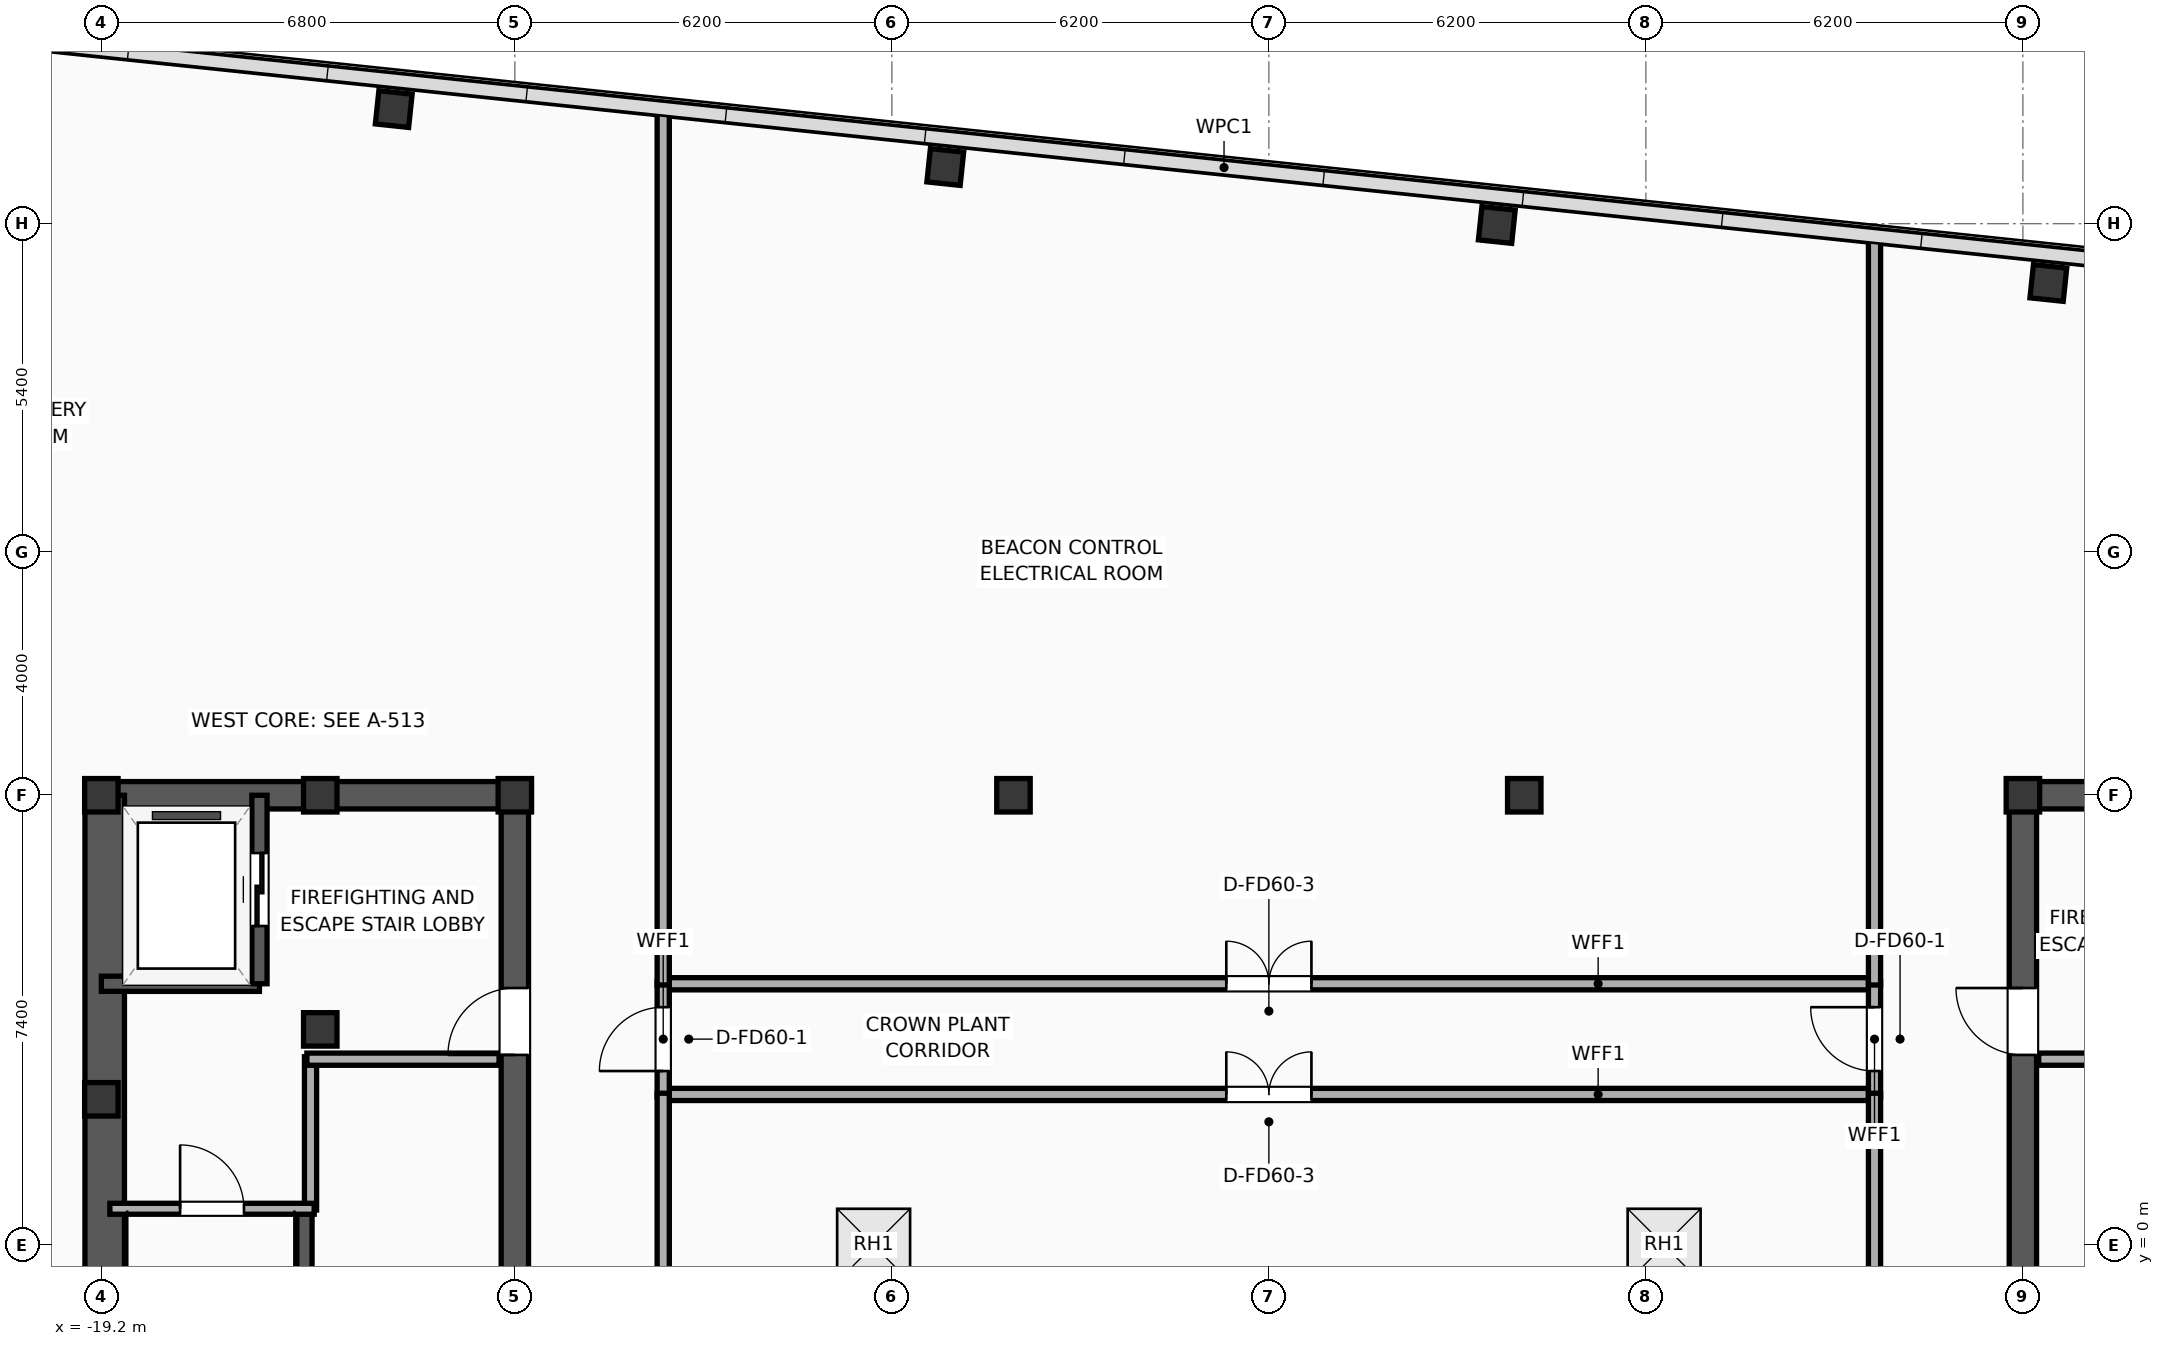
"""IFC4 building model, lengths in metres.
Left out: names, types, materials, properties, quantities, classifications, styles, units other than length and angle.
Written with IfcOpenShell. Run it as: python <this file> out.ifc"""

import sys

from ifc_helpers import new_model, si_unit, direction, frame, frame_2d, origin, origin_2d, place, context, subcontext, project, spatial, rectangle, hollow_rectangle, extrude, element, fill, save


model = new_model("IFC4")
c1 = context("Model", 3, precision=1e-05, world=origin(), true_north=direction((0.0, 1.0)))
c2 = subcontext(c1, "Body", "Model", "MODEL_VIEW")
j1 = project(units=[si_unit("LENGTHUNIT", "METRE"), si_unit("PLANEANGLEUNIT", "RADIAN")], contexts=[c1])
p1 = place(None, origin())
s1 = spatial("IfcSite", under=j1, at=p1, CompositionType="ELEMENT")
p2 = place(p1, origin())
s2 = spatial("IfcBuilding", under=s1, at=p2, CompositionType="ELEMENT")
p3 = place(p2, frame((0.0, 0.0, 337.2)))
s3 = spatial("IfcBuildingStorey", under=s2, at=p3, CompositionType="ELEMENT", Elevation=337.2)
for number, where, z_axis, x_axis in (
    (1, (-19.2, 2.4, 0.0), (0.0, 0.0, 1.0), (1.0, 0.0, 0.0)),
    (2, (-19.2, 7.4, 0.0), (0.0, 0.0, 1.0), (1.0, 0.0, 0.0)),
    (3, (-15.6, 7.4, 0.0), (0.0, 0.0, 1.0), (1.0, 0.0, 0.0)),
    (4, (-15.6, 3.55, 0.0), (0.0, 0.0, 1.0), (1.0, 0.0, 0.0)),
    (5, (-12.4, 7.4, 0.0), (0.0, 0.0, 1.0), (1.0, 0.0, 0.0)),
    (6, (12.4, 7.4, 0.0), (0.0, 0.0, 1.0), (1.0, 0.0, 0.0)),
):
    element("IfcColumn", number, at=place(p3, frame(where, z_axis=z_axis, x_axis=x_axis)), inside=s3, PredefinedType="COLUMN", context=c2, shape_type="SweptSolid", body=[
        extrude(hollow_rectangle(XDim=0.55, YDim=0.55, WallThickness=0.022, at=origin_2d()), origin(), (0.0, 0.0, 1.0), 5.22),
    ])
p4 = place(p3, frame((-19.425, 7.4, 0.0), z_axis=(0.0, 0.0, 1.0), x_axis=(1.0, 0.0, 0.0)))
e7 = element("IfcWall", 7, at=p4, inside=s3, PredefinedType="SHEAR", context=c2, shape_type="SweptSolid", body=[
    extrude(rectangle(XDim=7.25, YDim=0.45, at=frame_2d((3.625, 0.0))), origin(), (0.0, 0.0, 1.0), 4.96),
])
p5 = place(p3, frame((-19.145, -7.4, 0.0), z_axis=(0.0, 0.0, 1.0), x_axis=(0.0, 1.0, 0.0)))
e8 = element("IfcWall", 8, at=p5, inside=s3, PredefinedType="SHEAR", context=c2, shape_type="SweptSolid", body=[
    extrude(rectangle(XDim=14.8, YDim=0.65, at=frame_2d((7.4, 0.0))), origin(), (0.0, 0.0, 1.0), 4.96),
])
p6 = place(p3, frame((-12.4, -7.4, 0.0), z_axis=(0.0, 0.0, 1.0), x_axis=(0.0, 1.0, 0.0)))
e9 = element("IfcWall", 9, at=p6, inside=s3, PredefinedType="SHEAR", context=c2, shape_type="SweptSolid", body=[
    extrude(rectangle(XDim=14.8, YDim=0.45, at=frame_2d((7.4, 0.0))), origin(), (0.0, 0.0, 1.0), 4.96),
])
p7 = place(p6, frame((10.53, 0.0, 0.0)))
e10 = element("IfcOpeningElement", 10, at=p7, cuts=e9, PredefinedType="OPENING", context=c2, shape_type="SweptSolid", body=[
    extrude(rectangle(XDim=1.1, YDim=2.05, at=frame_2d((0.55, 1.025))), frame((0.0, 0.235, 0.0), z_axis=(0.0, -1.0, 0.0), x_axis=(1.0, 0.0, 0.0)), (0.0, 0.0, 1.0), 0.47),
])
p8 = place(p6, frame((4.45, 0.0, 0.0)))
e11 = element("IfcOpeningElement", 11, at=p8, cuts=e9, PredefinedType="OPENING", context=c2, shape_type="SweptSolid", body=[
    extrude(rectangle(XDim=0.9, YDim=2.05, at=frame_2d((0.45, 1.025))), frame((0.0, 0.235, 0.0), z_axis=(0.0, -1.0, 0.0), x_axis=(1.0, 0.0, 0.0)), (0.0, 0.0, 1.0), 0.47),
])
p9 = place(p3, frame((-15.86, -7.085, 0.0), z_axis=(0.0, 0.0, 1.0), x_axis=(0.0, 1.0, 0.0)))
e12 = element("IfcWall", 12, at=p9, inside=s3, PredefinedType="SOLIDWALL", context=c2, shape_type="SweptSolid", body=[
    extrude(rectangle(XDim=7.685, YDim=0.25, at=frame_2d((3.843, 0.0))), origin(), (0.0, 0.0, 1.0), 4.96),
])
p10 = place(p3, frame((12.175, 7.4, 0.0), z_axis=(0.0, 0.0, 1.0), x_axis=(1.0, 0.0, 0.0)))
e13 = element("IfcWall", 13, at=p10, inside=s3, PredefinedType="SHEAR", context=c2, shape_type="SweptSolid", body=[
    extrude(rectangle(XDim=7.25, YDim=0.45, at=frame_2d((3.625, 0.0))), origin(), (0.0, 0.0, 1.0), 4.96),
])
p11 = place(p3, frame((12.4, -7.4, 0.0), z_axis=(0.0, 0.0, 1.0), x_axis=(0.0, 1.0, 0.0)))
e14 = element("IfcWall", 14, at=p11, inside=s3, PredefinedType="SHEAR", context=c2, shape_type="SweptSolid", body=[
    extrude(rectangle(XDim=14.8, YDim=0.45, at=frame_2d((7.4, 0.0))), origin(), (0.0, 0.0, 1.0), 4.96),
])
p12 = place(p11, frame((10.53, 0.0, 0.0)))
e15 = element("IfcOpeningElement", 15, at=p12, cuts=e14, PredefinedType="OPENING", context=c2, shape_type="SweptSolid", body=[
    extrude(rectangle(XDim=1.1, YDim=2.05, at=frame_2d((0.55, 1.025))), frame((0.0, 0.235, 0.0), z_axis=(0.0, -1.0, 0.0), x_axis=(1.0, 0.0, 0.0)), (0.0, 0.0, 1.0), 0.47),
])
p13 = place(p11, frame((4.45, 0.0, 0.0)))
e16 = element("IfcOpeningElement", 16, at=p13, cuts=e14, PredefinedType="OPENING", context=c2, shape_type="SweptSolid", body=[
    extrude(rectangle(XDim=0.9, YDim=2.05, at=frame_2d((0.45, 1.025))), frame((0.0, 0.235, 0.0), z_axis=(0.0, -1.0, 0.0), x_axis=(1.0, 0.0, 0.0)), (0.0, 0.0, 1.0), 0.47),
])
for number, where, z_axis, x_axis in (
    (17, (-4.2, 7.4, 0.0), (0.0, 0.0, 1.0), (1.0, 0.0, 0.0)),
    (18, (4.2, 7.4, 0.0), (0.0, 0.0, 1.0), (1.0, 0.0, 0.0)),
):
    element("IfcColumn", number, at=place(p3, frame(where, z_axis=z_axis, x_axis=x_axis)), inside=s3, PredefinedType="COLUMN", context=c2, shape_type="SweptSolid", body=[
        extrude(hollow_rectangle(XDim=0.55, YDim=0.55, WallThickness=0.022, at=origin_2d()), origin(), (0.0, 0.0, 1.0), 5.22),
    ])
for number, where, z_axis, x_axis in (
    (19, (12.819, 15.825, 0.0), (0.0, 0.0, 1.0), (0.995, -0.105, 0.0)),
    (20, (3.749, 16.778, 0.0), (0.0, 0.0, 1.0), (0.995, -0.105, 0.0)),
    (21, (-5.322, 17.732, 0.0), (0.0, 0.0, 1.0), (0.995, -0.105, 0.0)),
    (22, (-14.392, 18.685, 0.0), (0.0, 0.0, 1.0), (0.995, -0.105, 0.0)),
):
    element("IfcColumn", number, at=place(p3, frame(where, z_axis=z_axis, x_axis=x_axis)), inside=s3, PredefinedType="COLUMN", context=c2, shape_type="SweptSolid", body=[
        extrude(hollow_rectangle(XDim=0.55, YDim=0.55, WallThickness=0.022, at=origin_2d()), origin(), (0.0, 0.0, 1.0), 5.265),
    ])
p14 = place(p3, frame((-23.395, 20.104, 0.0), z_axis=(0.0, 0.0, 1.0), x_axis=(0.994522116558, -0.104526358762, 0.0)))
e23 = element("IfcWall", 23, at=p14, inside=s3, PredefinedType="PARAPET", context=c2, shape_type="SweptSolid", body=[
    extrude(rectangle(XDim=45.564, YDim=0.22, at=frame_2d((22.782, 0.0))), origin(), (0.0, 0.0, 1.0), 1.2),
])
p15 = place(p3, frame((-19.2, 4.3, 0.0), z_axis=(0.0, 0.0, 1.0), x_axis=(1.0, 0.0, 0.0)))
e24 = element("IfcWall", 24, at=p15, inside=s3, PredefinedType="SOLIDWALL", context=c2, shape_type="SweptSolid", body=[
    extrude(rectangle(XDim=2.6, YDim=0.25, at=frame_2d((1.3, 0.0))), origin(), (0.0, 0.0, 1.0), 4.96),
])
p16 = place(p3, frame((-16.6, 4.3, 0.0), z_axis=(0.0, 0.0, 1.0), x_axis=(0.0, 1.0, 0.0)))
e25 = element("IfcWall", 25, at=p16, inside=s3, PredefinedType="SOLIDWALL", context=c2, shape_type="SweptSolid", body=[
    extrude(rectangle(XDim=3.1, YDim=0.25, at=frame_2d((1.55, 0.0))), origin(), (0.0, 0.0, 1.0), 4.96),
])
p17 = place(p16, frame((0.95, 0.0, 0.0)))
e26 = element("IfcOpeningElement", 26, at=p17, cuts=e25, PredefinedType="OPENING", context=c2, shape_type="SweptSolid", body=[
    extrude(rectangle(XDim=1.2, YDim=2.05, at=frame_2d((0.6, 1.025))), frame((0.0, 0.135, 0.0), z_axis=(0.0, -1.0, 0.0), x_axis=(1.0, 0.0, 0.0)), (0.0, 0.0, 1.0), 0.27),
])
p18 = place(p3, frame((-15.76, 0.58, 0.0), z_axis=(0.0, 0.0, 1.0), x_axis=(0.0, 1.0, 0.0)))
e27 = element("IfcWall", 27, at=p18, inside=s3, PredefinedType="PARTITIONING", context=c2, shape_type="SweptSolid", body=[
    extrude(rectangle(XDim=2.52, YDim=0.2, at=frame_2d((1.26, 0.0))), origin(), (0.0, 0.0, 1.0), 4.96),
])
p19 = place(p3, frame((-15.82, 3.06, 0.0), z_axis=(0.0, 0.0, 1.0), x_axis=(1.0, 0.0, 0.0)))
e28 = element("IfcWall", 28, at=p19, inside=s3, PredefinedType="PARTITIONING", context=c2, shape_type="SweptSolid", body=[
    extrude(rectangle(XDim=3.16, YDim=0.2, at=frame_2d((1.58, 0.0))), origin(), (0.0, 0.0, 1.0), 4.96),
])
p20 = place(p3, frame((-19.06, 0.6, 0.0), z_axis=(0.0, 0.0, 1.0), x_axis=(1.0, 0.0, 0.0)))
e29 = element("IfcWall", 29, at=p20, inside=s3, PredefinedType="PARTITIONING", context=c2, shape_type="SweptSolid", body=[
    extrude(rectangle(XDim=3.36, YDim=0.18, at=frame_2d((1.68, 0.0))), origin(), (0.0, 0.0, 1.0), 4.96),
])
p21 = place(p20, frame((1.155, 0.0, 0.0)))
e30 = element("IfcOpeningElement", 30, at=p21, cuts=e29, PredefinedType="OPENING", context=c2, shape_type="SweptSolid", body=[
    extrude(rectangle(XDim=1.05, YDim=2.05, at=frame_2d((0.525, 1.025))), frame((0.0, 0.1, 0.0), z_axis=(0.0, -1.0, 0.0), x_axis=(1.0, 0.0, 0.0)), (0.0, 0.0, 1.0), 0.2),
])
p22 = place(p3, frame((12.66, 3.06, 0.0), z_axis=(0.0, 0.0, 1.0), x_axis=(1.0, 0.0, 0.0)))
e31 = element("IfcWall", 31, at=p22, inside=s3, PredefinedType="PARTITIONING", context=c2, shape_type="SweptSolid", body=[
    extrude(rectangle(XDim=3.16, YDim=0.2, at=frame_2d((1.58, 0.0))), origin(), (0.0, 0.0, 1.0), 4.96),
])
p23 = place(p3, frame((-9.98, 2.48, 0.0), z_axis=(0.0, 0.0, 1.0), x_axis=(1.0, 0.0, 0.0)))
e32 = element("IfcWall", 32, at=p23, inside=s3, PredefinedType="PARTITIONING", context=c2, shape_type="SweptSolid", body=[
    extrude(rectangle(XDim=19.96, YDim=0.2, at=frame_2d((9.98, 0.0))), origin(), (0.0, 0.0, 1.0), 4.53),
])
p24 = place(p23, frame((9.28, 0.0, 0.0)))
e33 = element("IfcOpeningElement", 33, at=p24, cuts=e32, PredefinedType="OPENING", context=c2, shape_type="SweptSolid", body=[
    extrude(rectangle(XDim=1.4, YDim=2.05, at=frame_2d((0.7, 1.025))), frame((0.0, 0.11, 0.0), z_axis=(0.0, -1.0, 0.0), x_axis=(1.0, 0.0, 0.0)), (0.0, 0.0, 1.0), 0.22),
])
p25 = place(p3, frame((-9.98, 4.3, 0.0), z_axis=(0.0, 0.0, 1.0), x_axis=(1.0, 0.0, 0.0)))
e34 = element("IfcWall", 34, at=p25, inside=s3, PredefinedType="PARTITIONING", context=c2, shape_type="SweptSolid", body=[
    extrude(rectangle(XDim=19.96, YDim=0.2, at=frame_2d((9.98, 0.0))), origin(), (0.0, 0.0, 1.0), 4.96),
])
p26 = place(p25, frame((9.28, 0.0, 0.0)))
e35 = element("IfcOpeningElement", 35, at=p26, cuts=e34, PredefinedType="OPENING", context=c2, shape_type="SweptSolid", body=[
    extrude(rectangle(XDim=1.4, YDim=2.05, at=frame_2d((0.7, 1.025))), frame((0.0, 0.11, 0.0), z_axis=(0.0, -1.0, 0.0), x_axis=(1.0, 0.0, 0.0)), (0.0, 0.0, 1.0), 0.22),
])
p27 = place(p3, frame((-9.96, 2.44, 0.0), z_axis=(0.0, 0.0, 1.0), x_axis=(0.0, 1.0, 0.0)))
e36 = element("IfcWall", 36, at=p27, inside=s3, PredefinedType="PARTITIONING", context=c2, shape_type="SweptSolid", body=[
    extrude(rectangle(XDim=1.9, YDim=0.2, at=frame_2d((0.95, 0.0))), origin(), (0.0, 0.0, 1.0), 4.96),
])
p28 = place(p27, frame((0.425, 0.0, 0.0)))
e37 = element("IfcOpeningElement", 37, at=p28, cuts=e36, PredefinedType="OPENING", context=c2, shape_type="SweptSolid", body=[
    extrude(rectangle(XDim=1.05, YDim=2.05, at=frame_2d((0.525, 1.025))), frame((0.0, 0.11, 0.0), z_axis=(0.0, -1.0, 0.0), x_axis=(1.0, 0.0, 0.0)), (0.0, 0.0, 1.0), 0.22),
])
p29 = place(p3, frame((9.96, 2.44, 0.0), z_axis=(0.0, 0.0, 1.0), x_axis=(0.0, 1.0, 0.0)))
e38 = element("IfcWall", 38, at=p29, inside=s3, PredefinedType="PARTITIONING", context=c2, shape_type="SweptSolid", body=[
    extrude(rectangle(XDim=1.9, YDim=0.2, at=frame_2d((0.95, 0.0))), origin(), (0.0, 0.0, 1.0), 4.96),
])
p30 = place(p29, frame((0.425, 0.0, 0.0)))
e39 = element("IfcOpeningElement", 39, at=p30, cuts=e38, PredefinedType="OPENING", context=c2, shape_type="SweptSolid", body=[
    extrude(rectangle(XDim=1.05, YDim=2.05, at=frame_2d((0.525, 1.025))), frame((0.0, 0.11, 0.0), z_axis=(0.0, -1.0, 0.0), x_axis=(1.0, 0.0, 0.0)), (0.0, 0.0, 1.0), 0.22),
])
p31 = place(p3, frame((-9.96, -17.125, 0.0), z_axis=(0.0, 0.0, 1.0), x_axis=(0.0, 1.0, 0.0)))
e40 = element("IfcWall", 40, at=p31, inside=s3, PredefinedType="PARTITIONING", context=c2, shape_type="SweptSolid", body=[
    extrude(rectangle(XDim=19.625, YDim=0.2, at=frame_2d((9.812, 0.0))), origin(), (0.0, 0.0, 1.0), 4.4),
])
p32 = place(p3, frame((-9.96, 4.28, 0.0), z_axis=(0.0, 0.0, 1.0), x_axis=(0.0, 1.0, 0.0)))
e41 = element("IfcWall", 41, at=p32, inside=s3, PredefinedType="PARTITIONING", context=c2, shape_type="SweptSolid", body=[
    extrude(rectangle(XDim=14.392, YDim=0.2, at=frame_2d((7.196, 0.0))), origin(), (0.0, 0.0, 1.0), 4.96),
])
p33 = place(p3, frame((9.96, -19.218, 0.0), z_axis=(0.0, 0.0, 1.0), x_axis=(0.0, 1.0, 0.0)))
e42 = element("IfcWall", 42, at=p33, inside=s3, PredefinedType="PARTITIONING", context=c2, shape_type="SweptSolid", body=[
    extrude(rectangle(XDim=21.718, YDim=0.2, at=frame_2d((10.859, 0.0))), origin(), (0.0, 0.0, 1.0), 4.4),
])
p34 = place(p3, frame((9.96, 4.28, 0.0), z_axis=(0.0, 0.0, 1.0), x_axis=(0.0, 1.0, 0.0)))
e43 = element("IfcWall", 43, at=p34, inside=s3, PredefinedType="PARTITIONING", context=c2, shape_type="SweptSolid", body=[
    extrude(rectangle(XDim=12.298, YDim=0.2, at=frame_2d((6.149, 0.0))), origin(), (0.0, 0.0, 1.0), 4.96),
])
p35 = place(p2, frame((0.0, 0.0, 342.5)))
p36 = place(p35, frame((0.0, 0.0, -0.34)))
p37 = place(p36, frame((-6.5, 0.0, 0.0)))
p38 = place(p37, frame((0.0, 0.0, 0.29)))
e44 = element("IfcWindow", 44, at=p38, inside=s3, PartitioningType="SINGLE_PANEL", PredefinedType="SKYLIGHT", context=c2, shape_type="SweptSolid", body=[
    extrude(rectangle(XDim=1.2, YDim=1.2, at=origin_2d()), origin(), (0.0, 0.0, 1.0), 0.05),
])
p39 = place(p36, frame((6.5, 0.0, 0.0)))
p40 = place(p39, frame((0.0, 0.0, 0.29)))
e45 = element("IfcWindow", 45, at=p40, inside=s3, PartitioningType="SINGLE_PANEL", PredefinedType="SKYLIGHT", context=c2, shape_type="SweptSolid", body=[
    extrude(rectangle(XDim=1.2, YDim=1.2, at=origin_2d()), origin(), (0.0, 0.0, 1.0), 0.05),
])
p41 = place(p17, origin())
e46 = element("IfcDoor", 46, at=p41, inside=s3, OperationType="SLIDING_TO_LEFT", PredefinedType="DOOR", context=c2, shape_type="SweptSolid", body=[
    extrude(rectangle(XDim=1.2, YDim=2.05, at=frame_2d((0.6, 1.025))), frame((0.0, 0.025, 0.0), z_axis=(0.0, -1.0, 0.0), x_axis=(1.0, 0.0, 0.0)), (0.0, 0.0, 1.0), 0.05),
])
fill(e26, e46)
p42 = place(p21, origin())
e47 = element("IfcDoor", 47, at=p42, inside=s3, OperationType="SINGLE_SWING_LEFT", PredefinedType="DOOR", context=c2, shape_type="SweptSolid", body=[
    extrude(rectangle(XDim=1.05, YDim=2.05, at=frame_2d((0.525, 1.025))), frame((0.0, 0.025, 0.0), z_axis=(0.0, -1.0, 0.0), x_axis=(1.0, 0.0, 0.0)), (0.0, 0.0, 1.0), 0.05),
])
fill(e30, e47)
p43 = place(p24, origin())
e48 = element("IfcDoor", 48, at=p43, inside=s3, OperationType="DOUBLE_DOOR_SINGLE_SWING", PredefinedType="DOOR", context=c2, shape_type="SweptSolid", body=[
    extrude(rectangle(XDim=1.4, YDim=2.05, at=frame_2d((0.7, 1.025))), frame((0.0, 0.025, 0.0), z_axis=(0.0, -1.0, 0.0), x_axis=(1.0, 0.0, 0.0)), (0.0, 0.0, 1.0), 0.05),
])
fill(e33, e48)
p44 = place(p26, origin())
e49 = element("IfcDoor", 49, at=p44, inside=s3, OperationType="DOUBLE_DOOR_SINGLE_SWING", PredefinedType="DOOR", context=c2, shape_type="SweptSolid", body=[
    extrude(rectangle(XDim=1.4, YDim=2.05, at=frame_2d((0.7, 1.025))), frame((0.0, 0.025, 0.0), z_axis=(0.0, -1.0, 0.0), x_axis=(1.0, 0.0, 0.0)), (0.0, 0.0, 1.0), 0.05),
])
fill(e35, e49)
p45 = place(p28, origin())
e50 = element("IfcDoor", 50, at=p45, inside=s3, OperationType="SINGLE_SWING_LEFT", PredefinedType="DOOR", context=c2, shape_type="SweptSolid", body=[
    extrude(rectangle(XDim=1.05, YDim=2.05, at=frame_2d((0.525, 1.025))), frame((0.0, 0.025, 0.0), z_axis=(0.0, -1.0, 0.0), x_axis=(1.0, 0.0, 0.0)), (0.0, 0.0, 1.0), 0.05),
])
fill(e37, e50)
p46 = place(p30, origin())
e51 = element("IfcDoor", 51, at=p46, inside=s3, OperationType="SINGLE_SWING_RIGHT", PredefinedType="DOOR", context=c2, shape_type="SweptSolid", body=[
    extrude(rectangle(XDim=1.05, YDim=2.05, at=frame_2d((0.525, 1.025))), frame((0.0, 0.025, 0.0), z_axis=(0.0, -1.0, 0.0), x_axis=(1.0, 0.0, 0.0)), (0.0, 0.0, 1.0), 0.05),
])
fill(e39, e51)
p47 = place(p7, origin())
e52 = element("IfcDoor", 52, at=p47, inside=s3, OperationType="SINGLE_SWING_LEFT", PredefinedType="DOOR", context=c2, shape_type="SweptSolid", body=[
    extrude(rectangle(XDim=1.1, YDim=2.05, at=frame_2d((0.55, 1.025))), frame((0.0, 0.025, 0.0), z_axis=(0.0, -1.0, 0.0), x_axis=(1.0, 0.0, 0.0)), (0.0, 0.0, 1.0), 0.05),
])
fill(e10, e52)
p48 = place(p12, origin())
e53 = element("IfcDoor", 53, at=p48, inside=s3, OperationType="SINGLE_SWING_RIGHT", PredefinedType="DOOR", context=c2, shape_type="SweptSolid", body=[
    extrude(rectangle(XDim=1.1, YDim=2.05, at=frame_2d((0.55, 1.025))), frame((0.0, 0.025, 0.0), z_axis=(0.0, -1.0, 0.0), x_axis=(1.0, 0.0, 0.0)), (0.0, 0.0, 1.0), 0.05),
])
fill(e15, e53)
save(model, sys.argv[1])
